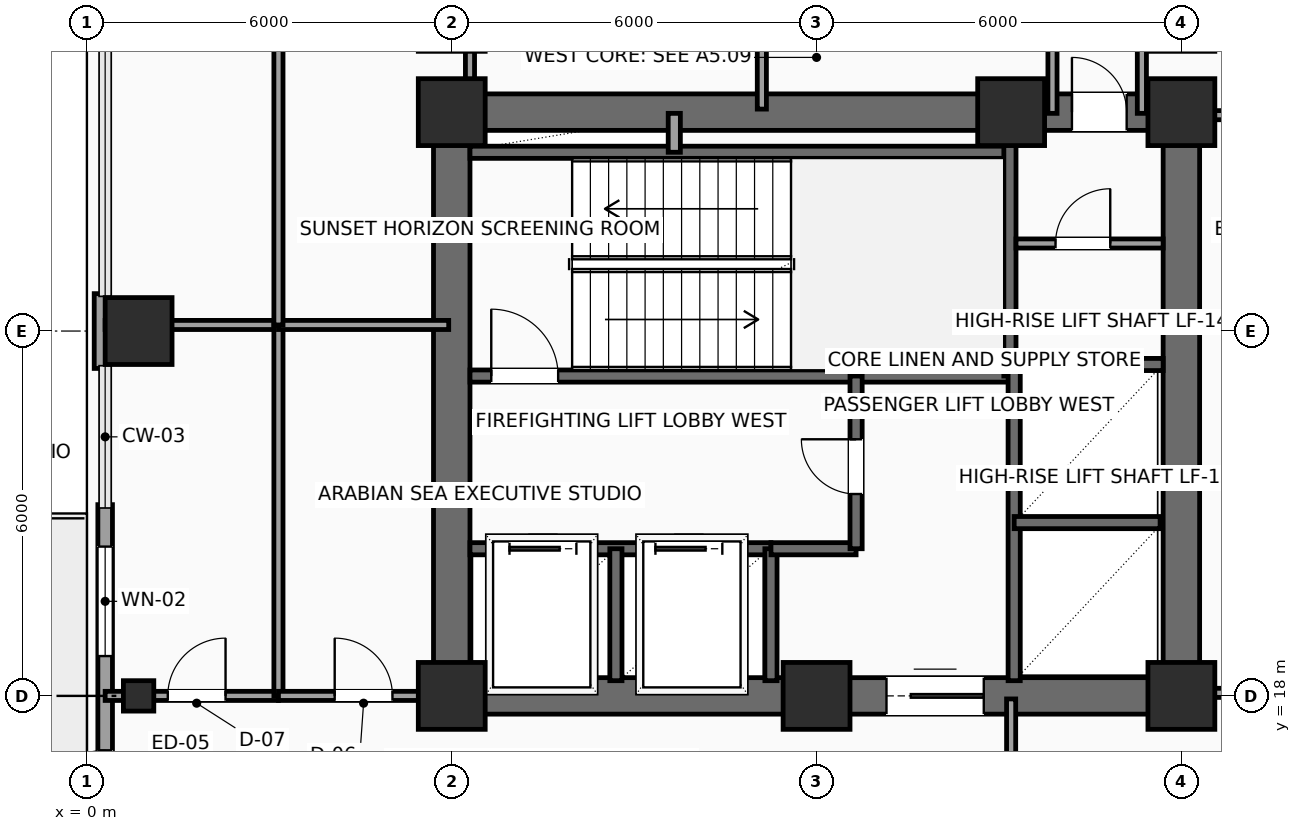
"""IFC4 building model, lengths in metres.
Left out: names, types, materials, properties, quantities, classifications, styles, units other than length and angle.
Written with IfcOpenShell. Run it as: python <this file> out.ifc"""

import sys

from ifc_helpers import new_model, si_unit, direction, frame, frame_2d, origin, origin_2d, place, context, subcontext, project, spatial, rectangle, hollow_rectangle, extrude, element, fill, save


model = new_model("IFC4")
c1 = context("Model", 3, precision=1e-05, world=origin(), true_north=direction((0.0, 1.0)))
c2 = subcontext(c1, "Body", "Model", "MODEL_VIEW")
j1 = project(units=[si_unit("LENGTHUNIT", "METRE"), si_unit("PLANEANGLEUNIT", "RADIAN")], contexts=[c1])
p1 = place(None, origin())
s1 = spatial("IfcSite", under=j1, at=p1, CompositionType="ELEMENT")
p2 = place(p1, origin())
s2 = spatial("IfcBuilding", under=s1, at=p2, CompositionType="ELEMENT")
p3 = place(p2, frame((0.0, 0.0, 156.9)))
s3 = spatial("IfcBuildingStorey", under=s2, at=p3, CompositionType="ELEMENT", Elevation=156.9)
for number, where, z_axis, x_axis in (
    (1, (6.0, 18.0, 0.0), (0.0, 0.0, 1.0), (1.0, 0.0, 0.0)),
    (2, (12.0, 18.0, 0.0), (0.0, 0.0, 1.0), (1.0, 0.0, 0.0)),
    (3, (18.0, 18.0, 0.0), (0.0, 0.0, 1.0), (1.0, 0.0, 0.0)),
    (4, (6.0, 27.6, 0.0), (0.0, 0.0, 1.0), (1.0, 0.0, 0.0)),
    (5, (15.2, 27.6, 0.0), (0.0, 0.0, 1.0), (1.0, 0.0, 0.0)),
    (6, (18.0, 27.6, 0.0), (0.0, 0.0, 1.0), (1.0, 0.0, 0.0)),
):
    element("IfcColumn", number, at=place(p3, frame(where, z_axis=z_axis, x_axis=x_axis)), inside=s3, PredefinedType="COLUMN", context=c2, shape_type="SweptSolid", body=[
        extrude(rectangle(XDim=1.1, YDim=1.1, at=origin_2d()), origin(), (0.0, 0.0, 1.0), 3.75),
    ])
p4 = place(p3, frame((0.85, 18.0, 0.0), z_axis=(0.0, 0.0, 1.0), x_axis=(1.0, 0.0, 0.0)))
e7 = element("IfcColumn", 7, at=p4, inside=s3, PredefinedType="COLUMN", context=c2, shape_type="SweptSolid", body=[
    extrude(hollow_rectangle(XDim=0.5, YDim=0.5, WallThickness=0.025, InnerFilletRadius=0.025, OuterFilletRadius=0.04, at=origin_2d()), origin(), (0.0, 0.0, 1.0), 3.75),
])
p5 = place(p3, frame((0.85, 24.0, 0.0), z_axis=(0.0, 0.0, 1.0), x_axis=(1.0, 0.0, 0.0)))
e8 = element("IfcColumn", 8, at=p5, inside=s3, PredefinedType="COLUMN", context=c2, shape_type="SweptSolid", body=[
    extrude(rectangle(XDim=1.1, YDim=1.1, at=origin_2d()), origin(), (0.0, 0.0, 1.0), 3.75),
])
p6 = place(p3, frame((0.3, 11.855, 0.0), z_axis=(0.0, 0.0, 1.0), x_axis=(0.0, 1.0, 0.0)))
e9 = element("IfcWall", 9, at=p6, inside=s3, PredefinedType="SOLIDWALL", context=c2, shape_type="SweptSolid", body=[
    extrude(rectangle(XDim=9.29, YDim=0.24, at=frame_2d((4.645, 0.0))), origin(), (0.0, 0.0, 1.0), 3.525),
])
p7 = place(p6, frame((4.2, 0.0, 0.0)))
e10 = element("IfcOpeningElement", 10, at=p7, cuts=e9, PredefinedType="OPENING", context=c2, shape_type="SweptSolid", body=[
    extrude(rectangle(XDim=1.05, YDim=2.2, at=frame_2d((0.525, 1.1))), frame((0.0, 0.13, 0.0), z_axis=(0.0, -1.0, 0.0), x_axis=(1.0, 0.0, 0.0)), (0.0, 0.0, 1.0), 0.26),
])
p8 = place(p6, frame((6.8, 0.0, 0.85)))
e11 = element("IfcOpeningElement", 11, at=p8, cuts=e9, PredefinedType="OPENING", context=c2, shape_type="SweptSolid", body=[
    extrude(rectangle(XDim=1.8, YDim=2.1, at=frame_2d((0.9, 1.05))), frame((0.0, 0.13, 0.0), z_axis=(0.0, -1.0, 0.0), x_axis=(1.0, 0.0, 0.0)), (0.0, 0.0, 1.0), 0.26),
])
p9 = place(p3, frame((0.24, 23.385, 0.0), z_axis=(0.0, 0.0, 1.0), x_axis=(0.0, 1.0, 0.0)))
e12 = element("IfcWall", 12, at=p9, inside=s3, PredefinedType="SOLIDWALL", context=c2, shape_type="SweptSolid", body=[
    extrude(rectangle(XDim=1.23, YDim=0.24, at=frame_2d((0.615, 0.0))), origin(), (0.0, 0.0, 1.0), 3.525),
])
p10 = place(p3, frame((6.0, 18.0, 0.0), z_axis=(0.0, 0.0, 1.0), x_axis=(1.0, 0.0, 0.0)))
e13 = element("IfcWall", 13, at=p10, inside=s3, PredefinedType="SHEAR", context=c2, shape_type="SweptSolid", body=[
    extrude(rectangle(XDim=12.0, YDim=0.6, at=frame_2d((6.0, 0.0))), origin(), (0.0, 0.0, 1.0), 3.525),
])
p11 = place(p10, frame((7.15, 0.0, 0.0)))
e14 = element("IfcOpeningElement", 14, at=p11, cuts=e13, PredefinedType="OPENING", context=c2, shape_type="SweptSolid", body=[
    extrude(rectangle(XDim=1.6, YDim=2.3, at=frame_2d((0.8, 1.15))), frame((0.0, 0.31, 0.0), z_axis=(0.0, -1.0, 0.0), x_axis=(1.0, 0.0, 0.0)), (0.0, 0.0, 1.0), 0.62),
])
p12 = place(p3, frame((6.0, 27.6, 0.0), z_axis=(0.0, 0.0, 1.0), x_axis=(1.0, 0.0, 0.0)))
e15 = element("IfcWall", 15, at=p12, inside=s3, PredefinedType="SHEAR", context=c2, shape_type="SweptSolid", body=[
    extrude(rectangle(XDim=12.0, YDim=0.6, at=frame_2d((6.0, 0.0))), origin(), (0.0, 0.0, 1.0), 3.525),
])
p13 = place(p12, frame((10.2, 0.0, 0.0)))
e16 = element("IfcOpeningElement", 16, at=p13, cuts=e15, PredefinedType="OPENING", context=c2, shape_type="SweptSolid", body=[
    extrude(rectangle(XDim=0.9, YDim=2.15, at=frame_2d((0.45, 1.075))), frame((0.0, 0.31, 0.0), z_axis=(0.0, -1.0, 0.0), x_axis=(1.0, 0.0, 0.0)), (0.0, 0.0, 1.0), 0.62),
])
for number, where, z_axis, x_axis in (
    (17, (6.0, 18.0, 0.0), (0.0, 0.0, 1.0), (0.0, 1.0, 0.0)),
    (18, (18.0, 18.0, 0.0), (0.0, 0.0, 1.0), (0.0, 1.0, 0.0)),
):
    element("IfcWall", number, at=place(p3, frame(where, z_axis=z_axis, x_axis=x_axis)), inside=s3, PredefinedType="SHEAR", context=c2, shape_type="SweptSolid", body=[
        extrude(rectangle(XDim=9.6, YDim=0.6, at=frame_2d((4.8, 0.0))), origin(), (0.0, 0.0, 1.0), 3.525),
    ])
p14 = place(p3, frame((6.3, 23.26, 0.0), z_axis=(0.0, 0.0, 1.0), x_axis=(1.0, 0.0, 0.0)))
e19 = element("IfcWall", 19, at=p14, inside=s3, PredefinedType="SHEAR", context=c2, shape_type="SweptSolid", body=[
    extrude(rectangle(XDim=8.88, YDim=0.2, at=frame_2d((4.44, 0.0))), origin(), (0.0, 0.0, 1.0), 3.525),
])
p15 = place(p14, frame((0.35, 0.0, 0.0)))
e20 = element("IfcOpeningElement", 20, at=p15, cuts=e19, PredefinedType="OPENING", context=c2, shape_type="SweptSolid", body=[
    extrude(rectangle(XDim=1.1, YDim=2.2, at=frame_2d((0.55, 1.1))), frame((0.0, 0.11, 0.0), z_axis=(0.0, -1.0, 0.0), x_axis=(1.0, 0.0, 0.0)), (0.0, 0.0, 1.0), 0.22),
])
p16 = place(p3, frame((6.3, 26.94, 0.0), z_axis=(0.0, 0.0, 1.0), x_axis=(1.0, 0.0, 0.0)))
e21 = element("IfcWall", 21, at=p16, inside=s3, PredefinedType="SHEAR", context=c2, shape_type="SweptSolid", body=[
    extrude(rectangle(XDim=8.88, YDim=0.2, at=frame_2d((4.44, 0.0))), origin(), (0.0, 0.0, 1.0), 3.525),
])
p17 = place(p3, frame((15.18, 23.26, 0.0), z_axis=(0.0, 0.0, 1.0), x_axis=(0.0, 1.0, 0.0)))
e22 = element("IfcWall", 22, at=p17, inside=s3, PredefinedType="SHEAR", context=c2, shape_type="SweptSolid", body=[
    extrude(rectangle(XDim=4.04, YDim=0.2, at=frame_2d((2.02, 0.0))), origin(), (0.0, 0.0, 1.0), 3.525),
])
p18 = place(p3, frame((6.3, 20.42, 0.0), z_axis=(0.0, 0.0, 1.0), x_axis=(1.0, 0.0, 0.0)))
e23 = element("IfcWall", 23, at=p18, inside=s3, PredefinedType="SHEAR", context=c2, shape_type="SweptSolid", body=[
    extrude(rectangle(XDim=4.95, YDim=0.2, at=frame_2d((2.475, 0.0))), origin(), (0.0, 0.0, 1.0), 3.525),
])
p19 = place(p18, frame((0.65, 0.0, 0.0)))
e24 = element("IfcOpeningElement", 24, at=p19, cuts=e23, PredefinedType="OPENING", context=c2, shape_type="SweptSolid", body=[
    extrude(rectangle(XDim=1.1, YDim=2.2, at=frame_2d((0.55, 1.1))), frame((0.0, 0.11, 0.0), z_axis=(0.0, -1.0, 0.0), x_axis=(1.0, 0.0, 0.0)), (0.0, 0.0, 1.0), 0.22),
])
p20 = place(p18, frame((3.05, 0.0, 0.0)))
e25 = element("IfcOpeningElement", 25, at=p20, cuts=e23, PredefinedType="OPENING", context=c2, shape_type="SweptSolid", body=[
    extrude(rectangle(XDim=1.1, YDim=2.2, at=frame_2d((0.55, 1.1))), frame((0.0, 0.11, 0.0), z_axis=(0.0, -1.0, 0.0), x_axis=(1.0, 0.0, 0.0)), (0.0, 0.0, 1.0), 0.22),
])
for number, where, z_axis, x_axis in (
    (26, (8.7, 18.25, 0.0), (0.0, 0.0, 1.0), (0.0, 1.0, 0.0)),
    (27, (11.25, 18.25, 0.0), (0.0, 0.0, 1.0), (0.0, 1.0, 0.0)),
):
    element("IfcWall", number, at=place(p3, frame(where, z_axis=z_axis, x_axis=x_axis)), inside=s3, PredefinedType="SHEAR", context=c2, shape_type="SweptSolid", body=[
        extrude(rectangle(XDim=2.17, YDim=0.2, at=frame_2d((1.085, 0.0))), origin(), (0.0, 0.0, 1.0), 3.525),
    ])
p21 = place(p3, frame((11.25, 20.42, 0.0), z_axis=(0.0, 0.0, 1.0), x_axis=(1.0, 0.0, 0.0)))
e28 = element("IfcWall", 28, at=p21, inside=s3, PredefinedType="SHEAR", context=c2, shape_type="SweptSolid", body=[
    extrude(rectangle(XDim=1.4, YDim=0.2, at=frame_2d((0.7, 0.0))), origin(), (0.0, 0.0, 1.0), 3.525),
])
p22 = place(p3, frame((12.65, 20.42, 0.0), z_axis=(0.0, 0.0, 1.0), x_axis=(0.0, 1.0, 0.0)))
e29 = element("IfcWall", 29, at=p22, inside=s3, PredefinedType="SHEAR", context=c2, shape_type="SweptSolid", body=[
    extrude(rectangle(XDim=2.84, YDim=0.2, at=frame_2d((1.42, 0.0))), origin(), (0.0, 0.0, 1.0), 3.525),
])
p23 = place(p22, frame((0.9, 0.0, 0.0)))
e30 = element("IfcOpeningElement", 30, at=p23, cuts=e29, PredefinedType="OPENING", context=c2, shape_type="SweptSolid", body=[
    extrude(rectangle(XDim=0.9, YDim=2.15, at=frame_2d((0.45, 1.075))), frame((0.0, 0.11, 0.0), z_axis=(0.0, -1.0, 0.0), x_axis=(1.0, 0.0, 0.0)), (0.0, 0.0, 1.0), 0.22),
])
p24 = place(p3, frame((9.66, 26.94, 0.0), z_axis=(0.0, 0.0, 1.0), x_axis=(0.0, 1.0, 0.0)))
e31 = element("IfcWall", 31, at=p24, inside=s3, PredefinedType="SOLIDWALL", context=c2, shape_type="SweptSolid", body=[
    extrude(rectangle(XDim=0.64, YDim=0.2, at=frame_2d((0.32, 0.0))), origin(), (0.0, 0.0, 1.0), 3.525),
])
p25 = place(p3, frame((15.25, 18.25, 0.0), z_axis=(0.0, 0.0, 1.0), x_axis=(0.0, 1.0, 0.0)))
e32 = element("IfcWall", 32, at=p25, inside=s3, PredefinedType="SHEAR", context=c2, shape_type="SweptSolid", body=[
    extrude(rectangle(XDim=5.2, YDim=0.2, at=frame_2d((2.6, 0.0))), origin(), (0.0, 0.0, 1.0), 3.525),
])
p26 = place(p3, frame((15.25, 20.85, 0.0), z_axis=(0.0, 0.0, 1.0), x_axis=(1.0, 0.0, 0.0)))
e33 = element("IfcWall", 33, at=p26, inside=s3, PredefinedType="SHEAR", context=c2, shape_type="SweptSolid", body=[
    extrude(rectangle(XDim=2.4, YDim=0.2, at=frame_2d((1.2, 0.0))), origin(), (0.0, 0.0, 1.0), 3.525),
])
p27 = place(p3, frame((15.25, 23.45, 0.0), z_axis=(0.0, 0.0, 1.0), x_axis=(1.0, 0.0, 0.0)))
e34 = element("IfcWall", 34, at=p27, inside=s3, PredefinedType="SHEAR", context=c2, shape_type="SweptSolid", body=[
    extrude(rectangle(XDim=2.45, YDim=0.2, at=frame_2d((1.225, 0.0))), origin(), (0.0, 0.0, 1.0), 3.525),
])
p28 = place(p3, frame((15.28, 25.44, 0.0), z_axis=(0.0, 0.0, 1.0), x_axis=(1.0, 0.0, 0.0)))
e35 = element("IfcWall", 35, at=p28, inside=s3, PredefinedType="PARTITIONING", context=c2, shape_type="SweptSolid", body=[
    extrude(rectangle(XDim=2.42, YDim=0.15, at=frame_2d((1.21, 0.0))), origin(), (0.0, 0.0, 1.0), 3.525),
])
p29 = place(p28, frame((0.65, 0.0, 0.0)))
e36 = element("IfcOpeningElement", 36, at=p29, cuts=e35, PredefinedType="OPENING", context=c2, shape_type="SweptSolid", body=[
    extrude(rectangle(XDim=0.9, YDim=2.15, at=frame_2d((0.45, 1.075))), frame((0.0, 0.085, 0.0), z_axis=(0.0, -1.0, 0.0), x_axis=(1.0, 0.0, 0.0)), (0.0, 0.0, 1.0), 0.17),
])
p30 = place(p3, frame((15.2, 17.95, 0.0), z_axis=(0.0, 0.0, 1.0), x_axis=(0.0, -1.0, 0.0)))
e37 = element("IfcWall", 37, at=p30, inside=s3, PredefinedType="PARTITIONING", context=c2, shape_type="SweptSolid", body=[
    extrude(rectangle(XDim=2.4, YDim=0.15, at=frame_2d((1.2, 0.0))), origin(), (0.0, 0.0, 1.0), 3.525),
])
for number, where, z_axis, x_axis in (
    (38, (17.35, 30.25, 0.0), (0.0, 0.0, 1.0), (0.0, -1.0, 0.0)),
    (39, (15.88, 27.58, 0.0), (0.0, 0.0, 1.0), (0.0, 1.0, 0.0)),
):
    element("IfcWall", number, at=place(p3, frame(where, z_axis=z_axis, x_axis=x_axis)), inside=s3, PredefinedType="PARTITIONING", context=c2, shape_type="SweptSolid", body=[
        extrude(rectangle(XDim=2.67, YDim=0.15, at=frame_2d((1.335, 0.0))), origin(), (0.0, 0.0, 1.0), 3.525),
    ])
p31 = place(p3, frame((18.1, 18.05, 0.0), z_axis=(0.0, 0.0, 1.0), x_axis=(1.0, 0.0, 0.0)))
e40 = element("IfcWall", 40, at=p31, inside=s3, PredefinedType="PARTITIONING", context=c2, shape_type="SweptSolid", body=[
    extrude(rectangle(XDim=3.25, YDim=0.15, at=frame_2d((1.625, 0.0))), origin(), (0.0, 0.0, 1.0), 3.017),
])
p32 = place(p3, frame((18.1, 27.55, 0.0), z_axis=(0.0, 0.0, 1.0), x_axis=(1.0, 0.0, 0.0)))
e41 = element("IfcWall", 41, at=p32, inside=s3, PredefinedType="PARTITIONING", context=c2, shape_type="SweptSolid", body=[
    extrude(rectangle(XDim=3.25, YDim=0.15, at=frame_2d((1.625, 0.0))), origin(), (0.0, 0.0, 1.0), 3.525),
])
p33 = place(p3, frame((0.3, 18.0, 0.0), z_axis=(0.0, 0.0, 1.0), x_axis=(1.0, 0.0, 0.0)))
e42 = element("IfcWall", 42, at=p33, inside=s3, PredefinedType="PARTITIONING", context=c2, shape_type="SweptSolid", body=[
    extrude(rectangle(XDim=2.85, YDim=0.15, at=frame_2d((1.425, 0.0))), origin(), (0.0, 0.0, 1.0), 3.017),
])
p34 = place(p33, frame((1.03, 0.0, 0.0)))
e43 = element("IfcOpeningElement", 43, at=p34, cuts=e42, PredefinedType="OPENING", context=c2, shape_type="SweptSolid", body=[
    extrude(rectangle(XDim=0.95, YDim=2.15, at=frame_2d((0.475, 1.075))), frame((0.0, 0.085, 0.0), z_axis=(0.0, -1.0, 0.0), x_axis=(1.0, 0.0, 0.0)), (0.0, 0.0, 1.0), 0.17),
])
p35 = place(p3, frame((0.3, 24.1, 0.0), z_axis=(0.0, 0.0, 1.0), x_axis=(1.0, 0.0, 0.0)))
e44 = element("IfcWall", 44, at=p35, inside=s3, PredefinedType="PARTITIONING", context=c2, shape_type="SweptSolid", body=[
    extrude(rectangle(XDim=2.85, YDim=0.15, at=frame_2d((1.425, 0.0))), origin(), (0.0, 0.0, 1.0), 3.525),
])
p36 = place(p3, frame((3.15, 18.0, 0.0), z_axis=(0.0, 0.0, 1.0), x_axis=(0.0, 1.0, 0.0)))
e45 = element("IfcWall", 45, at=p36, inside=s3, PredefinedType="PARTITIONING", context=c2, shape_type="SweptSolid", body=[
    extrude(rectangle(XDim=6.1, YDim=0.15, at=frame_2d((3.05, 0.0))), origin(), (0.0, 0.0, 1.0), 3.525),
])
p37 = place(p3, frame((3.15, 18.0, 0.0), z_axis=(0.0, 0.0, 1.0), x_axis=(1.0, 0.0, 0.0)))
e46 = element("IfcWall", 46, at=p37, inside=s3, PredefinedType="PARTITIONING", context=c2, shape_type="SweptSolid", body=[
    extrude(rectangle(XDim=2.8, YDim=0.15, at=frame_2d((1.4, 0.0))), origin(), (0.0, 0.0, 1.0), 3.017),
])
p38 = place(p37, frame((0.925, 0.0, 0.0)))
e47 = element("IfcOpeningElement", 47, at=p38, cuts=e46, PredefinedType="OPENING", context=c2, shape_type="SweptSolid", body=[
    extrude(rectangle(XDim=0.95, YDim=2.15, at=frame_2d((0.475, 1.075))), frame((0.0, 0.085, 0.0), z_axis=(0.0, -1.0, 0.0), x_axis=(1.0, 0.0, 0.0)), (0.0, 0.0, 1.0), 0.17),
])
p39 = place(p3, frame((3.15, 24.1, 0.0), z_axis=(0.0, 0.0, 1.0), x_axis=(1.0, 0.0, 0.0)))
e48 = element("IfcWall", 48, at=p39, inside=s3, PredefinedType="PARTITIONING", context=c2, shape_type="SweptSolid", body=[
    extrude(rectangle(XDim=2.8, YDim=0.15, at=frame_2d((1.4, 0.0))), origin(), (0.0, 0.0, 1.0), 3.525),
])
p40 = place(p3, frame((3.15, 24.1, 0.0), z_axis=(0.0, 0.0, 1.0), x_axis=(0.0, 1.0, 0.0)))
e49 = element("IfcWall", 49, at=p40, inside=s3, PredefinedType="PARTITIONING", context=c2, shape_type="SweptSolid", body=[
    extrude(rectangle(XDim=6.15, YDim=0.15, at=frame_2d((3.075, 0.0))), origin(), (0.0, 0.0, 1.0), 3.525),
])
p41 = place(p3, frame((6.3, 27.65, 0.0), z_axis=(0.0, 0.0, 1.0), x_axis=(0.0, 1.0, 0.0)))
e50 = element("IfcWall", 50, at=p41, inside=s3, PredefinedType="PARTITIONING", context=c2, shape_type="SweptSolid", body=[
    extrude(rectangle(XDim=2.6, YDim=0.15, at=frame_2d((1.3, 0.0))), origin(), (0.0, 0.0, 1.0), 3.017),
])
p42 = place(p3, frame((11.1, 27.65, 0.0), z_axis=(0.0, 0.0, 1.0), x_axis=(0.0, 1.0, 0.0)))
e51 = element("IfcWall", 51, at=p42, inside=s3, PredefinedType="PARTITIONING", context=c2, shape_type="SweptSolid", body=[
    extrude(rectangle(XDim=2.6, YDim=0.15, at=frame_2d((1.3, 0.0))), origin(), (0.0, 0.0, 1.0), 3.525),
])
p43 = place(p7, origin())
e52 = element("IfcDoor", 52, at=p43, inside=s3, OperationType="SINGLE_SWING_LEFT", PredefinedType="DOOR", context=c2, shape_type="SweptSolid", body=[
    extrude(rectangle(XDim=1.05, YDim=2.2, at=frame_2d((0.525, 1.1))), frame((0.0, 0.025, 0.0), z_axis=(0.0, -1.0, 0.0), x_axis=(1.0, 0.0, 0.0)), (0.0, 0.0, 1.0), 0.05),
])
fill(e10, e52)
p44 = place(p8, origin())
e53 = element("IfcWindow", 53, at=p44, inside=s3, PartitioningType="SINGLE_PANEL", PredefinedType="WINDOW", context=c2, shape_type="SweptSolid", body=[
    extrude(rectangle(XDim=1.8, YDim=2.1, at=frame_2d((0.9, 1.05))), frame((0.0, 0.03, 0.0), z_axis=(0.0, -1.0, 0.0), x_axis=(1.0, 0.0, 0.0)), (0.0, 0.0, 1.0), 0.06),
])
fill(e11, e53)
p45 = place(p11, origin())
e54 = element("IfcDoor", 54, at=p45, inside=s3, OperationType="DOUBLE_DOOR_SLIDING", PredefinedType="DOOR", context=c2, shape_type="SweptSolid", body=[
    extrude(rectangle(XDim=1.6, YDim=2.3, at=frame_2d((0.8, 1.15))), frame((0.0, 0.025, 0.0), z_axis=(0.0, -1.0, 0.0), x_axis=(1.0, 0.0, 0.0)), (0.0, 0.0, 1.0), 0.05),
])
fill(e14, e54)
p46 = place(p13, origin())
e55 = element("IfcDoor", 55, at=p46, inside=s3, OperationType="SINGLE_SWING_LEFT", PredefinedType="DOOR", context=c2, shape_type="SweptSolid", body=[
    extrude(rectangle(XDim=0.9, YDim=2.15, at=frame_2d((0.45, 1.075))), frame((0.0, 0.025, 0.0), z_axis=(0.0, -1.0, 0.0), x_axis=(1.0, 0.0, 0.0)), (0.0, 0.0, 1.0), 0.05),
])
fill(e16, e55)
p47 = place(p15, origin())
e56 = element("IfcDoor", 56, at=p47, inside=s3, OperationType="SINGLE_SWING_LEFT", PredefinedType="DOOR", context=c2, shape_type="SweptSolid", body=[
    extrude(rectangle(XDim=1.1, YDim=2.2, at=frame_2d((0.55, 1.1))), frame((0.0, 0.025, 0.0), z_axis=(0.0, -1.0, 0.0), x_axis=(1.0, 0.0, 0.0)), (0.0, 0.0, 1.0), 0.05),
])
fill(e20, e56)
p48 = place(p19, origin())
e57 = element("IfcDoor", 57, at=p48, inside=s3, OperationType="SLIDING_TO_LEFT", PredefinedType="DOOR", context=c2, shape_type="SweptSolid", body=[
    extrude(rectangle(XDim=1.1, YDim=2.2, at=frame_2d((0.55, 1.1))), frame((0.0, 0.025, 0.0), z_axis=(0.0, -1.0, 0.0), x_axis=(1.0, 0.0, 0.0)), (0.0, 0.0, 1.0), 0.05),
])
fill(e24, e57)
p49 = place(p20, origin())
e58 = element("IfcDoor", 58, at=p49, inside=s3, OperationType="SLIDING_TO_LEFT", PredefinedType="DOOR", context=c2, shape_type="SweptSolid", body=[
    extrude(rectangle(XDim=1.1, YDim=2.2, at=frame_2d((0.55, 1.1))), frame((0.0, 0.025, 0.0), z_axis=(0.0, -1.0, 0.0), x_axis=(1.0, 0.0, 0.0)), (0.0, 0.0, 1.0), 0.05),
])
fill(e25, e58)
p50 = place(p23, origin())
e59 = element("IfcDoor", 59, at=p50, inside=s3, OperationType="SINGLE_SWING_RIGHT", PredefinedType="DOOR", context=c2, shape_type="SweptSolid", body=[
    extrude(rectangle(XDim=0.9, YDim=2.15, at=frame_2d((0.45, 1.075))), frame((0.0, 0.025, 0.0), z_axis=(0.0, -1.0, 0.0), x_axis=(1.0, 0.0, 0.0)), (0.0, 0.0, 1.0), 0.05),
])
fill(e30, e59)
p51 = place(p29, origin())
e60 = element("IfcDoor", 60, at=p51, inside=s3, OperationType="SINGLE_SWING_RIGHT", PredefinedType="DOOR", context=c2, shape_type="SweptSolid", body=[
    extrude(rectangle(XDim=0.9, YDim=2.15, at=frame_2d((0.45, 1.075))), frame((0.0, 0.025, 0.0), z_axis=(0.0, -1.0, 0.0), x_axis=(1.0, 0.0, 0.0)), (0.0, 0.0, 1.0), 0.05),
])
fill(e36, e60)
p52 = place(p34, origin())
e61 = element("IfcDoor", 61, at=p52, inside=s3, OperationType="SINGLE_SWING_RIGHT", PredefinedType="DOOR", context=c2, shape_type="SweptSolid", body=[
    extrude(rectangle(XDim=0.95, YDim=2.15, at=frame_2d((0.475, 1.075))), frame((0.0, 0.025, 0.0), z_axis=(0.0, -1.0, 0.0), x_axis=(1.0, 0.0, 0.0)), (0.0, 0.0, 1.0), 0.05),
])
fill(e43, e61)
p53 = place(p38, origin())
e62 = element("IfcDoor", 62, at=p53, inside=s3, OperationType="SINGLE_SWING_LEFT", PredefinedType="DOOR", context=c2, shape_type="SweptSolid", body=[
    extrude(rectangle(XDim=0.95, YDim=2.15, at=frame_2d((0.475, 1.075))), frame((0.0, 0.025, 0.0), z_axis=(0.0, -1.0, 0.0), x_axis=(1.0, 0.0, 0.0)), (0.0, 0.0, 1.0), 0.05),
])
fill(e47, e62)
save(model, sys.argv[1])
